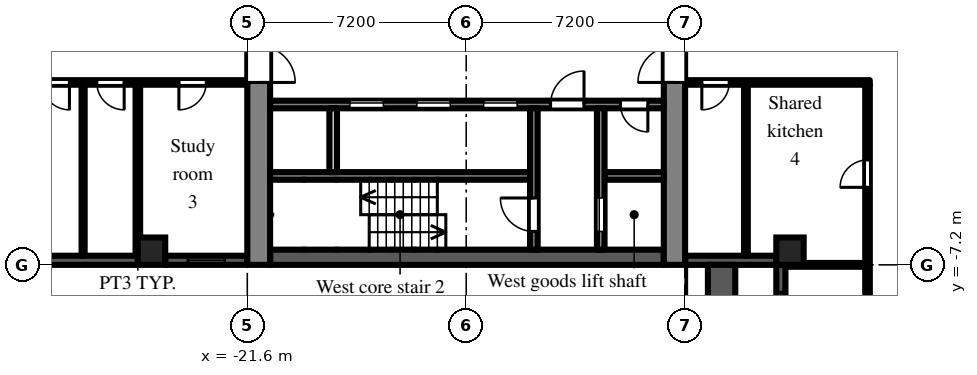
"""IFC4 building model, lengths in metres.
Left out: names, types, materials, properties, quantities, classifications, styles, units other than length and angle.
Written with IfcOpenShell. Run it as: python <this file> out.ifc"""

import sys

from ifc_helpers import new_model, si_unit, direction, frame, frame_2d, origin, origin_2d, place, context, subcontext, project, spatial, rectangle, extrude, element, fill, save


model = new_model("IFC4")
c1 = context("Model", 3, precision=1e-05, world=origin(), true_north=direction((0.0, 1.0)))
c2 = subcontext(c1, "Body", "Model", "MODEL_VIEW")
j1 = project(units=[si_unit("LENGTHUNIT", "METRE"), si_unit("PLANEANGLEUNIT", "RADIAN")], contexts=[c1])
p1 = place(None, origin())
s1 = spatial("IfcSite", under=j1, at=p1, CompositionType="ELEMENT")
p2 = place(p1, origin())
s2 = spatial("IfcBuilding", under=s1, at=p2, CompositionType="ELEMENT")
p3 = place(p2, frame((0.0, 0.0, 66.9)))
s3 = spatial("IfcBuildingStorey", under=s2, at=p3, CompositionType="ELEMENT", Elevation=66.9)
for number, where, z_axis, x_axis in (
    (1, (-24.75, -6.75, 0.0), (0.0, 0.0, 1.0), (1.0, 0.0, 0.0)),
    (2, (-3.75, -6.75, 0.0), (0.0, 0.0, 1.0), (1.0, 0.0, 0.0)),
):
    element("IfcColumn", number, at=place(p3, frame(where, z_axis=z_axis, x_axis=x_axis)), inside=s3, PredefinedType="COLUMN", context=c2, shape_type="SweptSolid", body=[
        extrude(rectangle(XDim=0.9, YDim=0.9, at=origin_2d()), origin(), (0.0, 0.0, 1.0), 3.0),
    ])
p4 = place(p3, frame((-28.35, -7.05, 0.0), z_axis=(0.0, 0.0, 1.0), x_axis=(1.0, 0.0, 0.0)))
e3 = element("IfcWall", 3, at=p4, inside=s3, PredefinedType="SOLIDWALL", context=c2, shape_type="SweptSolid", body=[
    extrude(rectangle(XDim=3.15, YDim=0.3, at=frame_2d((1.575, 0.0))), origin(), (0.0, 0.0, 1.0), 2.1),
])
p5 = place(p3, frame((-24.3, -7.05, 0.0), z_axis=(0.0, 0.0, 1.0), x_axis=(1.0, 0.0, 0.0)))
e4 = element("IfcWall", 4, at=p5, inside=s3, PredefinedType="SOLIDWALL", context=c2, shape_type="SweptSolid", body=[
    extrude(rectangle(XDim=2.7, YDim=0.3, at=frame_2d((1.35, 0.0))), origin(), (0.0, 0.0, 1.0), 2.1),
])
p6 = place(p5, frame((0.75, 0.0, 0.2)))
e5 = element("IfcOpeningElement", 5, at=p6, cuts=e4, PredefinedType="OPENING", context=c2, shape_type="SweptSolid", body=[
    extrude(rectangle(XDim=1.2, YDim=1.85, at=frame_2d((0.6, 0.925))), frame((0.0, 0.16, 0.0), z_axis=(0.0, -1.0, 0.0), x_axis=(1.0, 0.0, 0.0)), (0.0, 0.0, 1.0), 0.32),
])
p7 = place(p3, frame((-7.2, -7.05, 0.0), z_axis=(0.0, 0.0, 1.0), x_axis=(1.0, 0.0, 0.0)))
e6 = element("IfcWall", 6, at=p7, inside=s3, PredefinedType="SOLIDWALL", context=c2, shape_type="SweptSolid", body=[
    extrude(rectangle(XDim=3.0, YDim=0.3, at=frame_2d((1.5, 0.0))), origin(), (0.0, 0.0, 1.0), 2.1),
])
p8 = place(p3, frame((-4.05, -7.2, 0.0), z_axis=(0.0, 0.0, 1.0), x_axis=(0.0, -1.0, 0.0)))
e7 = element("IfcWall", 7, at=p8, inside=s3, PredefinedType="SOLIDWALL", context=c2, shape_type="SweptSolid", body=[
    extrude(rectangle(XDim=7.2, YDim=0.3, at=frame_2d((3.6, 0.0))), origin(), (0.0, 0.0, 1.0), 2.1),
])
p9 = place(p8, frame((3.0, 0.0, 0.0)))
e8 = element("IfcOpeningElement", 8, at=p9, cuts=e7, PredefinedType="OPENING", context=c2, shape_type="SweptSolid", body=[
    extrude(rectangle(XDim=1.2, YDim=2.05, at=frame_2d((0.6, 1.025))), frame((0.0, 0.16, 0.0), z_axis=(0.0, -1.0, 0.0), x_axis=(1.0, 0.0, 0.0)), (0.0, 0.0, 1.0), 0.32),
])
p10 = place(p8, frame((0.9, 0.0, 0.2)))
e9 = element("IfcOpeningElement", 9, at=p10, cuts=e7, PredefinedType="OPENING", context=c2, shape_type="SweptSolid", body=[
    extrude(rectangle(XDim=1.8, YDim=1.85, at=frame_2d((0.9, 0.925))), frame((0.0, 0.16, 0.0), z_axis=(0.0, -1.0, 0.0), x_axis=(1.0, 0.0, 0.0)), (0.0, 0.0, 1.0), 0.32),
])
p11 = place(p8, frame((4.5, 0.0, 0.2)))
e10 = element("IfcOpeningElement", 10, at=p11, cuts=e7, PredefinedType="OPENING", context=c2, shape_type="SweptSolid", body=[
    extrude(rectangle(XDim=1.8, YDim=1.85, at=frame_2d((0.9, 0.925))), frame((0.0, 0.16, 0.0), z_axis=(0.0, -1.0, 0.0), x_axis=(1.0, 0.0, 0.0)), (0.0, 0.0, 1.0), 0.32),
])
p12 = place(p3, frame((-6.0, -14.4, 0.0), z_axis=(0.0, 0.0, 1.0), x_axis=(0.0, 1.0, 0.0)))
e11 = element("IfcWall", 11, at=p12, inside=s3, PredefinedType="PARAPET", context=c2, shape_type="SweptSolid", body=[
    extrude(rectangle(XDim=7.2, YDim=0.9, at=frame_2d((3.6, 0.0))), origin(), (0.0, 0.0, 1.0), 0.8),
])
p13 = place(p3, frame((-7.55, -7.2, 0.0), z_axis=(0.0, 0.0, 1.0), x_axis=(0.0, 1.0, 0.0)))
e12 = element("IfcWall", 12, at=p13, inside=s3, PredefinedType="SHEAR", context=c2, shape_type="SweptSolid", body=[
    extrude(rectangle(XDim=14.4, YDim=0.7, at=frame_2d((7.2, 0.0))), origin(), (0.0, 0.0, 1.0), 2.575),
])
p14 = place(p13, frame((6.0, 0.0, 0.0)))
e13 = element("IfcOpeningElement", 13, at=p14, cuts=e12, PredefinedType="OPENING", context=c2, shape_type="SweptSolid", body=[
    extrude(rectangle(XDim=2.4, YDim=2.2, at=frame_2d((1.2, 1.1))), frame((0.0, 0.36, 0.0), z_axis=(0.0, -1.0, 0.0), x_axis=(1.0, 0.0, 0.0)), (0.0, 0.0, 1.0), 0.72),
])
p15 = place(p3, frame((-21.225, -7.2, 0.0), z_axis=(0.0, 0.0, 1.0), x_axis=(0.0, 1.0, 0.0)))
e14 = element("IfcWall", 14, at=p15, inside=s3, PredefinedType="SHEAR", context=c2, shape_type="SweptSolid", body=[
    extrude(rectangle(XDim=14.4, YDim=0.75, at=frame_2d((7.2, 0.0))), origin(), (0.0, 0.0, 1.0), 2.575),
])
p16 = place(p15, frame((6.0, 0.0, 0.0)))
e15 = element("IfcOpeningElement", 15, at=p16, cuts=e14, PredefinedType="OPENING", context=c2, shape_type="SweptSolid", body=[
    extrude(rectangle(XDim=2.4, YDim=2.2, at=frame_2d((1.2, 1.1))), frame((0.0, 0.385, 0.0), z_axis=(0.0, -1.0, 0.0), x_axis=(1.0, 0.0, 0.0)), (0.0, 0.0, 1.0), 0.77),
])
p17 = place(p3, frame((-7.9, -6.95, 0.0), z_axis=(0.0, 0.0, 1.0), x_axis=(-1.0, 0.0, 0.0)))
e16 = element("IfcWall", 16, at=p17, inside=s3, PredefinedType="SHEAR", context=c2, shape_type="SweptSolid", body=[
    extrude(rectangle(XDim=12.95, YDim=0.5, at=frame_2d((6.475, 0.0))), origin(), (0.0, 0.0, 1.0), 2.575),
])
p18 = place(p3, frame((-7.9, -1.925, 0.0), z_axis=(0.0, 0.0, 1.0), x_axis=(-1.0, 0.0, 0.0)))
e17 = element("IfcWall", 17, at=p18, inside=s3, PredefinedType="SHEAR", context=c2, shape_type="SweptSolid", body=[
    extrude(rectangle(XDim=12.95, YDim=0.25, at=frame_2d((6.475, 0.0))), origin(), (0.0, 0.0, 1.0), 2.575),
])
p19 = place(p18, frame((4.825, 0.0, 0.0)))
e18 = element("IfcOpeningElement", 18, at=p19, cuts=e17, PredefinedType="OPENING", context=c2, shape_type="SweptSolid", body=[
    extrude(rectangle(XDim=1.1, YDim=2.1, at=frame_2d((0.55, 1.05))), frame((0.0, 0.135, 0.0), z_axis=(0.0, -1.0, 0.0), x_axis=(1.0, 0.0, 0.0)), (0.0, 0.0, 1.0), 0.27),
])
p20 = place(p18, frame((7.025, 0.0, 0.0)))
e19 = element("IfcOpeningElement", 19, at=p20, cuts=e17, PredefinedType="OPENING", context=c2, shape_type="SweptSolid", body=[
    extrude(rectangle(XDim=1.1, YDim=2.1, at=frame_2d((0.55, 1.05))), frame((0.0, 0.135, 0.0), z_axis=(0.0, -1.0, 0.0), x_axis=(1.0, 0.0, 0.0)), (0.0, 0.0, 1.0), 0.27),
])
p21 = place(p18, frame((9.225, 0.0, 0.0)))
e20 = element("IfcOpeningElement", 20, at=p21, cuts=e17, PredefinedType="OPENING", context=c2, shape_type="SweptSolid", body=[
    extrude(rectangle(XDim=1.1, YDim=2.1, at=frame_2d((0.55, 1.05))), frame((0.0, 0.135, 0.0), z_axis=(0.0, -1.0, 0.0), x_axis=(1.0, 0.0, 0.0)), (0.0, 0.0, 1.0), 0.27),
])
p22 = place(p18, frame((0.525, 0.0, 0.0)))
e21 = element("IfcOpeningElement", 21, at=p22, cuts=e17, PredefinedType="OPENING", context=c2, shape_type="SweptSolid", body=[
    extrude(rectangle(XDim=0.9, YDim=2.1, at=frame_2d((0.45, 1.05))), frame((0.0, 0.135, 0.0), z_axis=(0.0, -1.0, 0.0), x_axis=(1.0, 0.0, 0.0)), (0.0, 0.0, 1.0), 0.27),
])
p23 = place(p18, frame((2.625, 0.0, 0.0)))
e22 = element("IfcOpeningElement", 22, at=p23, cuts=e17, PredefinedType="OPENING", context=c2, shape_type="SweptSolid", body=[
    extrude(rectangle(XDim=1.1, YDim=2.1, at=frame_2d((0.55, 1.05))), frame((0.0, 0.135, 0.0), z_axis=(0.0, -1.0, 0.0), x_axis=(1.0, 0.0, 0.0)), (0.0, 0.0, 1.0), 0.27),
])
p24 = place(p3, frame((-7.9, -4.275, 0.0), z_axis=(0.0, 0.0, 1.0), x_axis=(-1.0, 0.0, 0.0)))
e23 = element("IfcWall", 23, at=p24, inside=s3, PredefinedType="SHEAR", context=c2, shape_type="SweptSolid", body=[
    extrude(rectangle(XDim=1.95, YDim=0.25, at=frame_2d((0.975, 0.0))), origin(), (0.0, 0.0, 1.0), 2.575),
])
p25 = place(p3, frame((-12.3, -4.275, 0.0), z_axis=(0.0, 0.0, 1.0), x_axis=(-1.0, 0.0, 0.0)))
e24 = element("IfcWall", 24, at=p25, inside=s3, PredefinedType="SHEAR", context=c2, shape_type="SweptSolid", body=[
    extrude(rectangle(XDim=8.55, YDim=0.25, at=frame_2d((4.275, 0.0))), origin(), (0.0, 0.0, 1.0), 2.575),
])
p26 = place(p3, frame((-9.975, -2.05, 0.0), z_axis=(0.0, 0.0, 1.0), x_axis=(0.0, -1.0, 0.0)))
e25 = element("IfcWall", 25, at=p26, inside=s3, PredefinedType="SHEAR", context=c2, shape_type="SweptSolid", body=[
    extrude(rectangle(XDim=4.65, YDim=0.25, at=frame_2d((2.325, 0.0))), origin(), (0.0, 0.0, 1.0), 2.575),
])
p27 = place(p26, frame((2.95, 0.0, 0.0)))
e26 = element("IfcOpeningElement", 26, at=p27, cuts=e25, PredefinedType="OPENING", context=c2, shape_type="SweptSolid", body=[
    extrude(rectangle(XDim=1.1, YDim=2.1, at=frame_2d((0.55, 1.05))), frame((0.0, 0.135, 0.0), z_axis=(0.0, -1.0, 0.0), x_axis=(1.0, 0.0, 0.0)), (0.0, 0.0, 1.0), 0.27),
])
p28 = place(p3, frame((-12.175, -2.05, 0.0), z_axis=(0.0, 0.0, 1.0), x_axis=(0.0, -1.0, 0.0)))
e27 = element("IfcWall", 27, at=p28, inside=s3, PredefinedType="SHEAR", context=c2, shape_type="SweptSolid", body=[
    extrude(rectangle(XDim=4.65, YDim=0.25, at=frame_2d((2.325, 0.0))), origin(), (0.0, 0.0, 1.0), 2.575),
])
p29 = place(p28, frame((2.95, 0.0, 0.0)))
e28 = element("IfcOpeningElement", 28, at=p29, cuts=e27, PredefinedType="OPENING", context=c2, shape_type="SweptSolid", body=[
    extrude(rectangle(XDim=1.1, YDim=2.1, at=frame_2d((0.55, 1.05))), frame((0.0, 0.135, 0.0), z_axis=(0.0, -1.0, 0.0), x_axis=(1.0, 0.0, 0.0)), (0.0, 0.0, 1.0), 0.27),
])
p30 = place(p3, frame((-18.775, -2.05, 0.0), z_axis=(0.0, 0.0, 1.0), x_axis=(0.0, -1.0, 0.0)))
e29 = element("IfcWall", 29, at=p30, inside=s3, PredefinedType="PARTITIONING", context=c2, shape_type="SweptSolid", body=[
    extrude(rectangle(XDim=2.1, YDim=0.25, at=frame_2d((1.05, 0.0))), origin(), (0.0, 0.0, 1.0), 2.575),
])
p31 = place(p3, frame((-36.5, -1.2, 0.0), z_axis=(0.0, 0.0, 1.0), x_axis=(1.0, 0.0, 0.0)))
e30 = element("IfcWall", 30, at=p31, inside=s3, PredefinedType="PARTITIONING", context=c2, shape_type="SweptSolid", body=[
    extrude(rectangle(XDim=14.9, YDim=0.15, at=frame_2d((7.45, 0.0))), origin(), (0.0, 0.0, 1.0), 2.575),
])
p32 = place(p31, frame((12.65, 0.0, 0.0)))
e31 = element("IfcOpeningElement", 31, at=p32, cuts=e30, PredefinedType="OPENING", context=c2, shape_type="SweptSolid", body=[
    extrude(rectangle(XDim=0.9, YDim=2.1, at=frame_2d((0.45, 1.05))), frame((0.0, 0.085, 0.0), z_axis=(0.0, -1.0, 0.0), x_axis=(1.0, 0.0, 0.0)), (0.0, 0.0, 1.0), 0.17),
])
p33 = place(p31, frame((9.95, 0.0, 0.0)))
e32 = element("IfcOpeningElement", 32, at=p33, cuts=e30, PredefinedType="OPENING", context=c2, shape_type="SweptSolid", body=[
    extrude(rectangle(XDim=0.9, YDim=2.1, at=frame_2d((0.45, 1.05))), frame((0.0, 0.085, 0.0), z_axis=(0.0, -1.0, 0.0), x_axis=(1.0, 0.0, 0.0)), (0.0, 0.0, 1.0), 0.17),
])
p34 = place(p31, frame((8.15, 0.0, 0.0)))
e33 = element("IfcOpeningElement", 33, at=p34, cuts=e30, PredefinedType="OPENING", context=c2, shape_type="SweptSolid", body=[
    extrude(rectangle(XDim=0.9, YDim=2.1, at=frame_2d((0.45, 1.05))), frame((0.0, 0.085, 0.0), z_axis=(0.0, -1.0, 0.0), x_axis=(1.0, 0.0, 0.0)), (0.0, 0.0, 1.0), 0.17),
])
p35 = place(p31, frame((6.1, 0.0, 0.0)))
e34 = element("IfcOpeningElement", 34, at=p35, cuts=e30, PredefinedType="OPENING", context=c2, shape_type="SweptSolid", body=[
    extrude(rectangle(XDim=1.0, YDim=2.1, at=frame_2d((0.5, 1.05))), frame((0.0, 0.085, 0.0), z_axis=(0.0, -1.0, 0.0), x_axis=(1.0, 0.0, 0.0)), (0.0, 0.0, 1.0), 0.17),
])
p36 = place(p31, frame((1.15, 0.0, 0.0)))
e35 = element("IfcOpeningElement", 35, at=p36, cuts=e30, PredefinedType="OPENING", context=c2, shape_type="SweptSolid", body=[
    extrude(rectangle(XDim=1.8, YDim=2.1, at=frame_2d((0.9, 1.05))), frame((0.0, 0.085, 0.0), z_axis=(0.0, -1.0, 0.0), x_axis=(1.0, 0.0, 0.0)), (0.0, 0.0, 1.0), 0.17),
])
p37 = place(p3, frame((-27.0, -6.9, 0.0), z_axis=(0.0, 0.0, 1.0), x_axis=(0.0, 1.0, 0.0)))
e36 = element("IfcWall", 36, at=p37, inside=s3, PredefinedType="PARTITIONING", context=c2, shape_type="SweptSolid", body=[
    extrude(rectangle(XDim=5.625, YDim=0.1, at=frame_2d((2.812, 0.0))), origin(), (0.0, 0.0, 1.0), 2.575),
])
p38 = place(p3, frame((-25.2, -6.9, 0.0), z_axis=(0.0, 0.0, 1.0), x_axis=(0.0, 1.0, 0.0)))
e37 = element("IfcWall", 37, at=p38, inside=s3, PredefinedType="PARTITIONING", context=c2, shape_type="SweptSolid", body=[
    extrude(rectangle(XDim=5.625, YDim=0.15, at=frame_2d((2.812, 0.0))), origin(), (0.0, 0.0, 1.0), 2.575),
])
p39 = place(p3, frame((-7.2, -1.2, 0.0), z_axis=(0.0, 0.0, 1.0), x_axis=(1.0, 0.0, 0.0)))
e38 = element("IfcWall", 38, at=p39, inside=s3, PredefinedType="PARTITIONING", context=c2, shape_type="SweptSolid", body=[
    extrude(rectangle(XDim=6.075, YDim=0.15, at=frame_2d((3.038, 0.0))), origin(), (0.0, 0.0, 1.0), 2.575),
])
p40 = place(p39, frame((0.55, 0.0, 0.0)))
e39 = element("IfcOpeningElement", 39, at=p40, cuts=e38, PredefinedType="OPENING", context=c2, shape_type="SweptSolid", body=[
    extrude(rectangle(XDim=0.9, YDim=2.1, at=frame_2d((0.45, 1.05))), frame((0.0, 0.085, 0.0), z_axis=(0.0, -1.0, 0.0), x_axis=(1.0, 0.0, 0.0)), (0.0, 0.0, 1.0), 0.17),
])
p41 = place(p3, frame((-5.2, -6.9, 0.0), z_axis=(0.0, 0.0, 1.0), x_axis=(0.0, 1.0, 0.0)))
e40 = element("IfcWall", 40, at=p41, inside=s3, PredefinedType="PARTITIONING", context=c2, shape_type="SweptSolid", body=[
    extrude(rectangle(XDim=5.625, YDim=0.125, at=frame_2d((2.812, 0.0))), origin(), (0.0, 0.0, 1.0), 2.575),
])
p42 = place(p3, frame((-3.9, -7.2, 0.0), z_axis=(0.0, 0.0, 1.0), x_axis=(1.0, 0.0, 0.0)))
e41 = element("IfcWall", 41, at=p42, inside=s3, PredefinedType="PARTITIONING", context=c2, shape_type="SweptSolid", body=[
    extrude(rectangle(XDim=2.625, YDim=0.125, at=frame_2d((1.312, 0.0))), origin(), (0.0, 0.0, 1.0), 2.575),
])
p43 = place(p3, frame((-1.2, -36.5, 0.0), z_axis=(0.0, 0.0, 1.0), x_axis=(0.0, 1.0, 0.0)))
e42 = element("IfcWall", 42, at=p43, inside=s3, PredefinedType="PARTITIONING", context=c2, shape_type="SweptSolid", body=[
    extrude(rectangle(XDim=35.225, YDim=0.15, at=frame_2d((17.613, 0.0))), origin(), (0.0, 0.0, 1.0), 2.575),
])
p44 = place(p43, frame((31.85, 0.0, 0.0)))
e43 = element("IfcOpeningElement", 43, at=p44, cuts=e42, PredefinedType="OPENING", context=c2, shape_type="SweptSolid", body=[
    extrude(rectangle(XDim=0.9, YDim=2.1, at=frame_2d((0.45, 1.05))), frame((0.0, 0.085, 0.0), z_axis=(0.0, -1.0, 0.0), x_axis=(1.0, 0.0, 0.0)), (0.0, 0.0, 1.0), 0.17),
])
p45 = place(p43, frame((23.05, 0.0, 0.0)))
e44 = element("IfcOpeningElement", 44, at=p45, cuts=e42, PredefinedType="OPENING", context=c2, shape_type="SweptSolid", body=[
    extrude(rectangle(XDim=0.9, YDim=2.1, at=frame_2d((0.45, 1.05))), frame((0.0, 0.085, 0.0), z_axis=(0.0, -1.0, 0.0), x_axis=(1.0, 0.0, 0.0)), (0.0, 0.0, 1.0), 0.17),
])
p46 = place(p43, frame((26.65, 0.0, 0.0)))
e45 = element("IfcOpeningElement", 45, at=p46, cuts=e42, PredefinedType="OPENING", context=c2, shape_type="SweptSolid", body=[
    extrude(rectangle(XDim=0.9, YDim=2.1, at=frame_2d((0.45, 1.05))), frame((0.0, 0.085, 0.0), z_axis=(0.0, -1.0, 0.0), x_axis=(1.0, 0.0, 0.0)), (0.0, 0.0, 1.0), 0.17),
])
p47 = place(p43, frame((1.55, 0.0, 0.0)))
e46 = element("IfcOpeningElement", 46, at=p47, cuts=e42, PredefinedType="OPENING", context=c2, shape_type="SweptSolid", body=[
    extrude(rectangle(XDim=1.0, YDim=2.1, at=frame_2d((0.5, 1.05))), frame((0.0, 0.085, 0.0), z_axis=(0.0, -1.0, 0.0), x_axis=(1.0, 0.0, 0.0)), (0.0, 0.0, 1.0), 0.17),
])
p48 = place(p6, origin())
e47 = element("IfcWindow", 47, at=p48, inside=s3, PartitioningType="SINGLE_PANEL", PredefinedType="WINDOW", context=c2, shape_type="SweptSolid", body=[
    extrude(rectangle(XDim=1.2, YDim=1.85, at=frame_2d((0.6, 0.925))), frame((0.0, 0.03, 0.0), z_axis=(0.0, -1.0, 0.0), x_axis=(1.0, 0.0, 0.0)), (0.0, 0.0, 1.0), 0.06),
])
fill(e5, e47)
p49 = place(p10, origin())
e48 = element("IfcWindow", 48, at=p49, inside=s3, PartitioningType="SINGLE_PANEL", PredefinedType="WINDOW", context=c2, shape_type="SweptSolid", body=[
    extrude(rectangle(XDim=1.8, YDim=1.85, at=frame_2d((0.9, 0.925))), frame((0.0, 0.03, 0.0), z_axis=(0.0, -1.0, 0.0), x_axis=(1.0, 0.0, 0.0)), (0.0, 0.0, 1.0), 0.06),
])
fill(e9, e48)
p50 = place(p19, origin())
e49 = element("IfcDoor", 49, at=p50, inside=s3, OperationType="SLIDING_TO_LEFT", PredefinedType="DOOR", context=c2, shape_type="SweptSolid", body=[
    extrude(rectangle(XDim=1.1, YDim=2.1, at=frame_2d((0.55, 1.05))), frame((0.0, 0.025, 0.0), z_axis=(0.0, -1.0, 0.0), x_axis=(1.0, 0.0, 0.0)), (0.0, 0.0, 1.0), 0.05),
])
fill(e18, e49)
p51 = place(p20, origin())
e50 = element("IfcDoor", 50, at=p51, inside=s3, OperationType="SLIDING_TO_LEFT", PredefinedType="DOOR", context=c2, shape_type="SweptSolid", body=[
    extrude(rectangle(XDim=1.1, YDim=2.1, at=frame_2d((0.55, 1.05))), frame((0.0, 0.025, 0.0), z_axis=(0.0, -1.0, 0.0), x_axis=(1.0, 0.0, 0.0)), (0.0, 0.0, 1.0), 0.05),
])
fill(e19, e50)
p52 = place(p21, origin())
e51 = element("IfcDoor", 51, at=p52, inside=s3, OperationType="SLIDING_TO_LEFT", PredefinedType="DOOR", context=c2, shape_type="SweptSolid", body=[
    extrude(rectangle(XDim=1.1, YDim=2.1, at=frame_2d((0.55, 1.05))), frame((0.0, 0.025, 0.0), z_axis=(0.0, -1.0, 0.0), x_axis=(1.0, 0.0, 0.0)), (0.0, 0.0, 1.0), 0.05),
])
fill(e20, e51)
p53 = place(p27, origin())
e52 = element("IfcDoor", 52, at=p53, inside=s3, OperationType="SLIDING_TO_LEFT", PredefinedType="DOOR", context=c2, shape_type="SweptSolid", body=[
    extrude(rectangle(XDim=1.1, YDim=2.1, at=frame_2d((0.55, 1.05))), frame((0.0, 0.025, 0.0), z_axis=(0.0, -1.0, 0.0), x_axis=(1.0, 0.0, 0.0)), (0.0, 0.0, 1.0), 0.05),
])
fill(e26, e52)
p54 = place(p29, frame((1.1, 0.0, 0.0), z_axis=(0.0, 0.0, 1.0), x_axis=(-1.0, 0.0, 0.0)))
e53 = element("IfcDoor", 53, at=p54, inside=s3, OperationType="SINGLE_SWING_RIGHT", PredefinedType="DOOR", context=c2, shape_type="SweptSolid", body=[
    extrude(rectangle(XDim=1.1, YDim=2.1, at=frame_2d((0.55, 1.05))), frame((0.0, 0.025, 0.0), z_axis=(0.0, -1.0, 0.0), x_axis=(1.0, 0.0, 0.0)), (0.0, 0.0, 1.0), 0.05),
])
fill(e28, e53)
p55 = place(p22, origin())
e54 = element("IfcDoor", 54, at=p55, inside=s3, OperationType="SINGLE_SWING_LEFT", PredefinedType="DOOR", context=c2, shape_type="SweptSolid", body=[
    extrude(rectangle(XDim=0.9, YDim=2.1, at=frame_2d((0.45, 1.05))), frame((0.0, 0.025, 0.0), z_axis=(0.0, -1.0, 0.0), x_axis=(1.0, 0.0, 0.0)), (0.0, 0.0, 1.0), 0.05),
])
fill(e21, e54)
p56 = place(p23, frame((1.1, 0.0, 0.0), z_axis=(0.0, 0.0, 1.0), x_axis=(-1.0, 0.0, 0.0)))
e55 = element("IfcDoor", 55, at=p56, inside=s3, OperationType="SINGLE_SWING_RIGHT", PredefinedType="DOOR", context=c2, shape_type="SweptSolid", body=[
    extrude(rectangle(XDim=1.1, YDim=2.1, at=frame_2d((0.55, 1.05))), frame((0.0, 0.025, 0.0), z_axis=(0.0, -1.0, 0.0), x_axis=(1.0, 0.0, 0.0)), (0.0, 0.0, 1.0), 0.05),
])
fill(e22, e55)
p57 = place(p14, origin())
e56 = element("IfcDoor", 56, at=p57, inside=s3, OperationType="DOUBLE_DOOR_DOUBLE_SWING", PredefinedType="DOOR", context=c2, shape_type="SweptSolid", body=[
    extrude(rectangle(XDim=2.4, YDim=2.2, at=frame_2d((1.2, 1.1))), frame((0.0, 0.025, 0.0), z_axis=(0.0, -1.0, 0.0), x_axis=(1.0, 0.0, 0.0)), (0.0, 0.0, 1.0), 0.05),
])
fill(e13, e56)
p58 = place(p16, frame((2.4, 0.0, 0.0), z_axis=(0.0, 0.0, 1.0), x_axis=(-1.0, 0.0, 0.0)))
e57 = element("IfcDoor", 57, at=p58, inside=s3, OperationType="DOUBLE_DOOR_DOUBLE_SWING", PredefinedType="DOOR", context=c2, shape_type="SweptSolid", body=[
    extrude(rectangle(XDim=2.4, YDim=2.2, at=frame_2d((1.2, 1.1))), frame((0.0, 0.025, 0.0), z_axis=(0.0, -1.0, 0.0), x_axis=(1.0, 0.0, 0.0)), (0.0, 0.0, 1.0), 0.05),
])
fill(e15, e57)
p59 = place(p44, origin())
e58 = element("IfcDoor", 58, at=p59, inside=s3, OperationType="SINGLE_SWING_LEFT", PredefinedType="DOOR", context=c2, shape_type="SweptSolid", body=[
    extrude(rectangle(XDim=0.9, YDim=2.1, at=frame_2d((0.45, 1.05))), frame((0.0, 0.025, 0.0), z_axis=(0.0, -1.0, 0.0), x_axis=(1.0, 0.0, 0.0)), (0.0, 0.0, 1.0), 0.05),
])
fill(e43, e58)
p60 = place(p40, frame((0.9, 0.0, 0.0), z_axis=(0.0, 0.0, 1.0), x_axis=(-1.0, 0.0, 0.0)))
e59 = element("IfcDoor", 59, at=p60, inside=s3, OperationType="SINGLE_SWING_RIGHT", PredefinedType="DOOR", context=c2, shape_type="SweptSolid", body=[
    extrude(rectangle(XDim=0.9, YDim=2.1, at=frame_2d((0.45, 1.05))), frame((0.0, 0.025, 0.0), z_axis=(0.0, -1.0, 0.0), x_axis=(1.0, 0.0, 0.0)), (0.0, 0.0, 1.0), 0.05),
])
fill(e39, e59)
p61 = place(p32, frame((0.9, 0.0, 0.0), z_axis=(0.0, 0.0, 1.0), x_axis=(-1.0, 0.0, 0.0)))
e60 = element("IfcDoor", 60, at=p61, inside=s3, OperationType="SINGLE_SWING_RIGHT", PredefinedType="DOOR", context=c2, shape_type="SweptSolid", body=[
    extrude(rectangle(XDim=0.9, YDim=2.1, at=frame_2d((0.45, 1.05))), frame((0.0, 0.025, 0.0), z_axis=(0.0, -1.0, 0.0), x_axis=(1.0, 0.0, 0.0)), (0.0, 0.0, 1.0), 0.05),
])
fill(e31, e60)
p62 = place(p33, frame((0.9, 0.0, 0.0), z_axis=(0.0, 0.0, 1.0), x_axis=(-1.0, 0.0, 0.0)))
e61 = element("IfcDoor", 61, at=p62, inside=s3, OperationType="SINGLE_SWING_LEFT", PredefinedType="DOOR", context=c2, shape_type="SweptSolid", body=[
    extrude(rectangle(XDim=0.9, YDim=2.1, at=frame_2d((0.45, 1.05))), frame((0.0, 0.025, 0.0), z_axis=(0.0, -1.0, 0.0), x_axis=(1.0, 0.0, 0.0)), (0.0, 0.0, 1.0), 0.05),
])
fill(e32, e61)
p63 = place(p34, frame((0.9, 0.0, 0.0), z_axis=(0.0, 0.0, 1.0), x_axis=(-1.0, 0.0, 0.0)))
e62 = element("IfcDoor", 62, at=p63, inside=s3, OperationType="SINGLE_SWING_LEFT", PredefinedType="DOOR", context=c2, shape_type="SweptSolid", body=[
    extrude(rectangle(XDim=0.9, YDim=2.1, at=frame_2d((0.45, 1.05))), frame((0.0, 0.025, 0.0), z_axis=(0.0, -1.0, 0.0), x_axis=(1.0, 0.0, 0.0)), (0.0, 0.0, 1.0), 0.05),
])
fill(e33, e62)
save(model, sys.argv[1])
